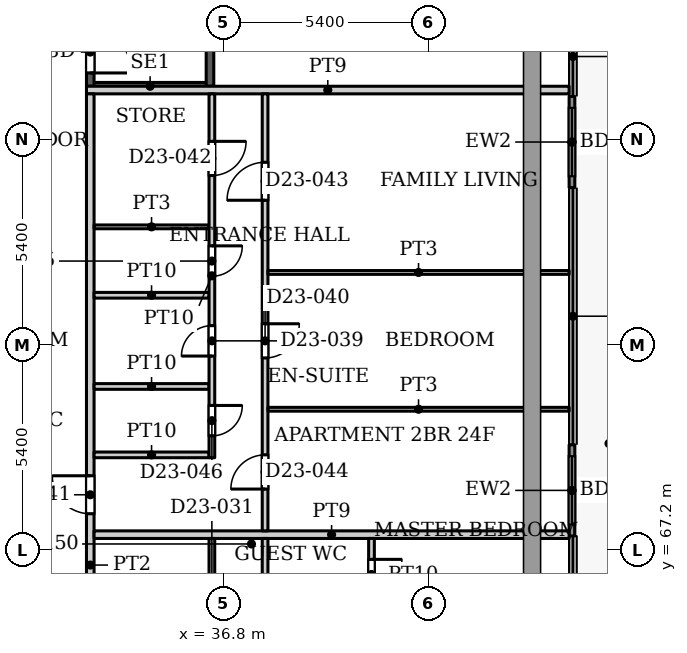
"""IFC4 building model, lengths in metres.
Left out: names, types, materials, properties, quantities, classifications, styles, units other than length and angle.
Written with IfcOpenShell. Run it as: python <this file> out.ifc"""

import sys

from ifc_helpers import new_model, si_unit, direction, frame, frame_2d, origin, place, context, subcontext, project, spatial, rectangle, extrude, source, transform, mapped, element, fill, save


model = new_model("IFC4")
c1 = context("Model", 3, precision=1e-05, world=origin(), true_north=direction((0.0, 1.0)))
c2 = subcontext(c1, "Body", "Model", "MODEL_VIEW")
j1 = project(units=[si_unit("LENGTHUNIT", "METRE"), si_unit("PLANEANGLEUNIT", "RADIAN")], contexts=[c1])
p1 = place(None, origin())
s1 = spatial("IfcSite", under=j1, at=p1, CompositionType="ELEMENT")
p2 = place(p1, origin())
s2 = spatial("IfcBuilding", under=s1, at=p2, CompositionType="ELEMENT")
p3 = place(p2, frame((0.0, 0.0, 105.8)))
s3 = spatial("IfcBuildingStorey", under=s2, at=p3, CompositionType="ELEMENT", Elevation=105.8)
p4 = place(p3, frame((45.975, 79.132, 0.0), z_axis=(0.0, 0.0, 1.0), x_axis=(0.0, -1.0, 0.0)))
e1 = element("IfcWall", 1, at=p4, inside=s3, PredefinedType="SOLIDWALL", context=c2, shape_type="SweptSolid", body=[
    extrude(rectangle(XDim=2.399, YDim=0.15, at=frame_2d((1.2, 0.0))), origin(), (0.0, 0.0, 1.0), 3.75),
])
p5 = place(p4, frame((0.3, 0.0, 0.0)))
e2 = element("IfcOpeningElement", 2, at=p5, cuts=e1, PredefinedType="OPENING", context=c2, shape_type="SweptSolid", body=[
    extrude(rectangle(XDim=1.8, YDim=2.4, at=frame_2d((0.9, 1.2))), frame((0.0, 0.085, 0.0), z_axis=(0.0, -1.0, 0.0), x_axis=(1.0, 0.0, 0.0)), (0.0, 0.0, 1.0), 0.17),
])
p6 = place(p3, frame((45.975, 69.965, 0.0), z_axis=(0.0, 0.0, 1.0), x_axis=(0.0, -1.0, 0.0)))
e3 = element("IfcWall", 3, at=p6, inside=s3, PredefinedType="SOLIDWALL", context=c2, shape_type="SweptSolid", body=[
    extrude(rectangle(XDim=2.4, YDim=0.15, at=frame_2d((1.2, 0.0))), origin(), (0.0, 0.0, 1.0), 3.75),
])
p7 = place(p6, frame((0.3, 0.0, 0.0)))
e4 = element("IfcOpeningElement", 4, at=p7, cuts=e3, PredefinedType="OPENING", context=c2, shape_type="SweptSolid", body=[
    extrude(rectangle(XDim=1.8, YDim=2.4, at=frame_2d((0.9, 1.2))), frame((0.0, 0.085, 0.0), z_axis=(0.0, -1.0, 0.0), x_axis=(1.0, 0.0, 0.0)), (0.0, 0.0, 1.0), 0.17),
])
p8 = place(p3, frame((33.3, 79.4, 0.0), z_axis=(0.0, 0.0, 1.0), x_axis=(1.0, 0.0, 0.0)))
e5 = element("IfcWall", 5, at=p8, inside=s3, PredefinedType="SHEAR", context=c2, shape_type="SweptSolid", body=[
    extrude(rectangle(XDim=3.15, YDim=0.2, at=frame_2d((1.575, 0.0))), origin(), (0.0, 0.0, 1.0), 3.9),
])
p9 = place(p3, frame((33.3, 79.4, 0.0), z_axis=(0.0, 0.0, 1.0), x_axis=(0.0, 1.0, 0.0)))
e6 = element("IfcWall", 6, at=p9, inside=s3, PredefinedType="SHEAR", context=c2, shape_type="SweptSolid", body=[
    extrude(rectangle(XDim=9.16, YDim=0.2, at=frame_2d((4.58, 0.0))), origin(), (0.0, 0.0, 1.0), 3.9),
])
p10 = place(p9, frame((0.35, 0.0, 0.0)))
e7 = element("IfcOpeningElement", 7, at=p10, cuts=e6, PredefinedType="OPENING", context=c2, shape_type="SweptSolid", body=[
    extrude(rectangle(XDim=1.1, YDim=2.2, at=frame_2d((0.55, 1.1))), frame((0.0, 0.11, 0.0), z_axis=(0.0, -1.0, 0.0), x_axis=(1.0, 0.0, 0.0)), (0.0, 0.0, 1.0), 0.22),
])
p11 = place(p3, frame((36.45, 79.4, 0.0), z_axis=(0.0, 0.0, 1.0), x_axis=(0.0, 1.0, 0.0)))
e8 = element("IfcWall", 8, at=p11, inside=s3, PredefinedType="SHEAR", context=c2, shape_type="SweptSolid", body=[
    extrude(rectangle(XDim=9.16, YDim=0.2, at=frame_2d((4.58, 0.0))), origin(), (0.0, 0.0, 1.0), 3.9),
])
p12 = place(p3, frame((33.2, 79.3, 0.0), z_axis=(0.0, 0.0, 1.0), x_axis=(1.0, 0.0, 0.0)))
e9 = element("IfcWall", 9, at=p12, inside=s3, PredefinedType="PARTITIONING", context=c2, shape_type="SweptSolid", body=[
    extrude(rectangle(XDim=12.7, YDim=0.2, at=frame_2d((6.35, 0.0))), origin(), (0.0, 0.0, 1.0), 3.6),
])
p13 = place(p3, frame((33.3, 54.4, 0.0), z_axis=(0.0, 0.0, 1.0), x_axis=(0.0, 1.0, 0.0)))
e10 = element("IfcWall", 10, at=p13, inside=s3, PredefinedType="PARTITIONING", context=c2, shape_type="SweptSolid", body=[
    extrude(rectangle(XDim=24.8, YDim=0.2, at=frame_2d((12.4, 0.0))), origin(), (0.0, 0.0, 1.0), 3.6),
])
p14 = place(p13, frame((0.4, 0.0, 0.0)))
e11 = element("IfcOpeningElement", 11, at=p14, cuts=e10, PredefinedType="OPENING", context=c2, shape_type="SweptSolid", body=[
    extrude(rectangle(XDim=1.0, YDim=2.1, at=frame_2d((0.5, 1.05))), frame((0.0, 0.11, 0.0), z_axis=(0.0, -1.0, 0.0), x_axis=(1.0, 0.0, 0.0)), (0.0, 0.0, 1.0), 0.22),
])
p15 = place(p13, frame((13.75, 0.0, 0.0)))
e12 = element("IfcOpeningElement", 12, at=p15, cuts=e10, PredefinedType="OPENING", context=c2, shape_type="SweptSolid", body=[
    extrude(rectangle(XDim=1.0, YDim=2.1, at=frame_2d((0.5, 1.05))), frame((0.0, 0.11, 0.0), z_axis=(0.0, -1.0, 0.0), x_axis=(1.0, 0.0, 0.0)), (0.0, 0.0, 1.0), 0.22),
])
p16 = place(p3, frame((33.4, 67.6, 0.0), z_axis=(0.0, 0.0, 1.0), x_axis=(1.0, 0.0, 0.0)))
e13 = element("IfcWall", 13, at=p16, inside=s3, PredefinedType="PARTITIONING", context=c2, shape_type="SweptSolid", body=[
    extrude(rectangle(XDim=12.5, YDim=0.2, at=frame_2d((6.25, 0.0))), origin(), (0.0, 0.0, 1.0), 3.6),
])
for number, where, z_axis, x_axis in (
    (14, (33.4, 69.7, 0.0), (0.0, 0.0, 1.0), (1.0, 0.0, 0.0)),
    (15, (33.4, 71.5, 0.0), (0.0, 0.0, 1.0), (1.0, 0.0, 0.0)),
    (16, (33.4, 73.9, 0.0), (0.0, 0.0, 1.0), (1.0, 0.0, 0.0)),
):
    element("IfcWall", number, at=place(p3, frame(where, z_axis=z_axis, x_axis=x_axis)), inside=s3, PredefinedType="PARTITIONING", context=c2, shape_type="SweptSolid", body=[
        extrude(rectangle(XDim=3.025, YDim=0.15, at=frame_2d((1.513, 0.0))), origin(), (0.0, 0.0, 1.0), 3.6),
    ])
p17 = place(p3, frame((33.4, 75.7, 0.0), z_axis=(0.0, 0.0, 1.0), x_axis=(1.0, 0.0, 0.0)))
e17 = element("IfcWall", 17, at=p17, inside=s3, PredefinedType="PARTITIONING", context=c2, shape_type="SweptSolid", body=[
    extrude(rectangle(XDim=3.025, YDim=0.1, at=frame_2d((1.513, 0.0))), origin(), (0.0, 0.0, 1.0), 3.6),
])
p18 = place(p3, frame((36.5, 57.35, 0.0), z_axis=(0.0, 0.0, 1.0), x_axis=(0.0, 1.0, 0.0)))
e18 = element("IfcWall", 18, at=p18, inside=s3, PredefinedType="PARTITIONING", context=c2, shape_type="SweptSolid", body=[
    extrude(rectangle(XDim=10.15, YDim=0.15, at=frame_2d((5.075, 0.0))), origin(), (0.0, 0.0, 1.0), 3.6),
])
p19 = place(p18, frame((8.35, 0.0, 0.0)))
e19 = element("IfcOpeningElement", 19, at=p19, cuts=e18, PredefinedType="OPENING", context=c2, shape_type="SweptSolid", body=[
    extrude(rectangle(XDim=0.8, YDim=2.1, at=frame_2d((0.4, 1.05))), frame((0.0, 0.085, 0.0), z_axis=(0.0, -1.0, 0.0), x_axis=(1.0, 0.0, 0.0)), (0.0, 0.0, 1.0), 0.17),
])
p20 = place(p18, frame((1.6, 0.0, 0.0)))
e20 = element("IfcOpeningElement", 20, at=p20, cuts=e18, PredefinedType="OPENING", context=c2, shape_type="SweptSolid", body=[
    extrude(rectangle(XDim=0.9, YDim=2.1, at=frame_2d((0.45, 1.05))), frame((0.0, 0.085, 0.0), z_axis=(0.0, -1.0, 0.0), x_axis=(1.0, 0.0, 0.0)), (0.0, 0.0, 1.0), 0.17),
])
p21 = place(p18, frame((5.65, 0.0, 0.0)))
e21 = element("IfcOpeningElement", 21, at=p21, cuts=e18, PredefinedType="OPENING", context=c2, shape_type="SweptSolid", body=[
    extrude(rectangle(XDim=0.8, YDim=2.1, at=frame_2d((0.4, 1.05))), frame((0.0, 0.085, 0.0), z_axis=(0.0, -1.0, 0.0), x_axis=(1.0, 0.0, 0.0)), (0.0, 0.0, 1.0), 0.17),
])
p22 = place(p3, frame((36.5, 69.625, 0.0), z_axis=(0.0, 0.0, 1.0), x_axis=(0.0, 1.0, 0.0)))
e22 = element("IfcWall", 22, at=p22, inside=s3, PredefinedType="PARTITIONING", context=c2, shape_type="SweptSolid", body=[
    extrude(rectangle(XDim=9.575, YDim=0.15, at=frame_2d((4.788, 0.0))), origin(), (0.0, 0.0, 1.0), 3.6),
])
p23 = place(p22, frame((2.675, 0.0, 0.0)))
e23 = element("IfcOpeningElement", 23, at=p23, cuts=e22, PredefinedType="OPENING", context=c2, shape_type="SweptSolid", body=[
    extrude(rectangle(XDim=0.8, YDim=2.1, at=frame_2d((0.4, 1.05))), frame((0.0, 0.085, 0.0), z_axis=(0.0, -1.0, 0.0), x_axis=(1.0, 0.0, 0.0)), (0.0, 0.0, 1.0), 0.17),
])
p24 = place(p22, frame((7.425, 0.0, 0.0)))
e24 = element("IfcOpeningElement", 24, at=p24, cuts=e22, PredefinedType="OPENING", context=c2, shape_type="SweptSolid", body=[
    extrude(rectangle(XDim=0.9, YDim=2.1, at=frame_2d((0.45, 1.05))), frame((0.0, 0.085, 0.0), z_axis=(0.0, -1.0, 0.0), x_axis=(1.0, 0.0, 0.0)), (0.0, 0.0, 1.0), 0.17),
])
p25 = place(p22, frame((4.775, 0.0, 0.0)))
e25 = element("IfcOpeningElement", 25, at=p25, cuts=e22, PredefinedType="OPENING", context=c2, shape_type="SweptSolid", body=[
    extrude(rectangle(XDim=0.8, YDim=2.1, at=frame_2d((0.4, 1.05))), frame((0.0, 0.085, 0.0), z_axis=(0.0, -1.0, 0.0), x_axis=(1.0, 0.0, 0.0)), (0.0, 0.0, 1.0), 0.17),
])
p26 = place(p22, frame((0.575, 0.0, 0.0)))
e26 = element("IfcOpeningElement", 26, at=p26, cuts=e22, PredefinedType="OPENING", context=c2, shape_type="SweptSolid", body=[
    extrude(rectangle(XDim=0.8, YDim=2.1, at=frame_2d((0.4, 1.05))), frame((0.0, 0.085, 0.0), z_axis=(0.0, -1.0, 0.0), x_axis=(1.0, 0.0, 0.0)), (0.0, 0.0, 1.0), 0.17),
])
p27 = place(p3, frame((37.9, 54.2, 0.0), z_axis=(0.0, 0.0, 1.0), x_axis=(0.0, 1.0, 0.0)))
e27 = element("IfcWall", 27, at=p27, inside=s3, PredefinedType="PARTITIONING", context=c2, shape_type="SweptSolid", body=[
    extrude(rectangle(XDim=13.3, YDim=0.15, at=frame_2d((6.65, 0.0))), origin(), (0.0, 0.0, 1.0), 3.6),
])
p28 = place(p27, frame((6.2, 0.0, 0.0)))
e28 = element("IfcOpeningElement", 28, at=p28, cuts=e27, PredefinedType="OPENING", context=c2, shape_type="SweptSolid", body=[
    extrude(rectangle(XDim=0.9, YDim=2.1, at=frame_2d((0.45, 1.05))), frame((0.0, 0.085, 0.0), z_axis=(0.0, -1.0, 0.0), x_axis=(1.0, 0.0, 0.0)), (0.0, 0.0, 1.0), 0.17),
])
p29 = place(p27, frame((1.95, 0.0, 0.0)))
e29 = element("IfcOpeningElement", 29, at=p29, cuts=e27, PredefinedType="OPENING", context=c2, shape_type="SweptSolid", body=[
    extrude(rectangle(XDim=1.0, YDim=2.1, at=frame_2d((0.5, 1.05))), frame((0.0, 0.085, 0.0), z_axis=(0.0, -1.0, 0.0), x_axis=(1.0, 0.0, 0.0)), (0.0, 0.0, 1.0), 0.17),
])
p30 = place(p27, frame((9.35, 0.0, 0.0)))
e30 = element("IfcOpeningElement", 30, at=p30, cuts=e27, PredefinedType="OPENING", context=c2, shape_type="SweptSolid", body=[
    extrude(rectangle(XDim=0.9, YDim=2.1, at=frame_2d((0.45, 1.05))), frame((0.0, 0.085, 0.0), z_axis=(0.0, -1.0, 0.0), x_axis=(1.0, 0.0, 0.0)), (0.0, 0.0, 1.0), 0.17),
])
p31 = place(p3, frame((37.9, 67.7, 0.0), z_axis=(0.0, 0.0, 1.0), x_axis=(0.0, 1.0, 0.0)))
e31 = element("IfcWall", 31, at=p31, inside=s3, PredefinedType="PARTITIONING", context=c2, shape_type="SweptSolid", body=[
    extrude(rectangle(XDim=11.5, YDim=0.15, at=frame_2d((5.75, 0.0))), origin(), (0.0, 0.0, 1.0), 3.6),
])
p32 = place(p31, frame((4.55, 0.0, 0.0)))
e32 = element("IfcOpeningElement", 32, at=p32, cuts=e31, PredefinedType="OPENING", context=c2, shape_type="SweptSolid", body=[
    extrude(rectangle(XDim=0.9, YDim=2.1, at=frame_2d((0.45, 1.05))), frame((0.0, 0.085, 0.0), z_axis=(0.0, -1.0, 0.0), x_axis=(1.0, 0.0, 0.0)), (0.0, 0.0, 1.0), 0.17),
])
p33 = place(p31, frame((8.7, 0.0, 0.0)))
e33 = element("IfcOpeningElement", 33, at=p33, cuts=e31, PredefinedType="OPENING", context=c2, shape_type="SweptSolid", body=[
    extrude(rectangle(XDim=1.0, YDim=2.1, at=frame_2d((0.5, 1.05))), frame((0.0, 0.085, 0.0), z_axis=(0.0, -1.0, 0.0), x_axis=(1.0, 0.0, 0.0)), (0.0, 0.0, 1.0), 0.17),
])
p34 = place(p31, frame((1.1, 0.0, 0.0)))
e34 = element("IfcOpeningElement", 34, at=p34, cuts=e31, PredefinedType="OPENING", context=c2, shape_type="SweptSolid", body=[
    extrude(rectangle(XDim=0.9, YDim=2.1, at=frame_2d((0.45, 1.05))), frame((0.0, 0.085, 0.0), z_axis=(0.0, -1.0, 0.0), x_axis=(1.0, 0.0, 0.0)), (0.0, 0.0, 1.0), 0.17),
])
for number, where, z_axis, x_axis in (
    (35, (37.975, 70.9, 0.0), (0.0, 0.0, 1.0), (1.0, 0.0, 0.0)),
    (36, (37.975, 74.5, 0.0), (0.0, 0.0, 1.0), (1.0, 0.0, 0.0)),
):
    element("IfcWall", number, at=place(p3, frame(where, z_axis=z_axis, x_axis=x_axis)), inside=s3, PredefinedType="PARTITIONING", context=c2, shape_type="SweptSolid", body=[
        extrude(rectangle(XDim=7.925, YDim=0.1, at=frame_2d((3.962, 0.0))), origin(), (0.0, 0.0, 1.0), 3.6),
    ])
p35 = place(p3, frame((40.7, 65.575, 0.0), z_axis=(0.0, 0.0, 1.0), x_axis=(0.0, 1.0, 0.0)))
e37 = element("IfcWall", 37, at=p35, inside=s3, PredefinedType="PARTITIONING", context=c2, shape_type="SweptSolid", body=[
    extrude(rectangle(XDim=1.925, YDim=0.15, at=frame_2d((0.962, 0.0))), origin(), (0.0, 0.0, 1.0), 3.6),
])
p36 = place(p35, frame((0.575, 0.0, 0.0)))
e38 = element("IfcOpeningElement", 38, at=p36, cuts=e37, PredefinedType="OPENING", context=c2, shape_type="SweptSolid", body=[
    extrude(rectangle(XDim=0.8, YDim=2.1, at=frame_2d((0.4, 1.05))), frame((0.0, 0.085, 0.0), z_axis=(0.0, -1.0, 0.0), x_axis=(1.0, 0.0, 0.0)), (0.0, 0.0, 1.0), 0.17),
])
m1 = source(origin(), c2, "Body", "SweptSolid", [
    extrude(rectangle(XDim=1.8, YDim=2.4, at=frame_2d((0.9, 1.2))), frame((0.0, 0.025, 0.0), z_axis=(0.0, -1.0, 0.0), x_axis=(1.0, 0.0, 0.0)), (0.0, 0.0, 1.0), 0.05),
])
p37 = place(p5, origin())
e39 = element("IfcDoor", 39, at=p37, inside=s3, OperationType="SLIDING_TO_LEFT", PredefinedType="DOOR", context=c2, shape_type="MappedRepresentation", body=[
    mapped(m1, transform((0.0, 0.0, 0.0), x_axis=(1.0, 0.0, 0.0), y_axis=(0.0, 1.0, 0.0), z_axis=(0.0, 0.0, 1.0), scale=1.0)),
])
fill(e2, e39)
p38 = place(p7, origin())
e40 = element("IfcDoor", 40, at=p38, inside=s3, OperationType="SLIDING_TO_LEFT", PredefinedType="DOOR", context=c2, shape_type="MappedRepresentation", body=[
    mapped(m1, transform((0.0, 0.0, 0.0), x_axis=(1.0, 0.0, 0.0), y_axis=(0.0, 1.0, 0.0), z_axis=(0.0, 0.0, 1.0), scale=1.0)),
])
fill(e4, e40)
m2 = source(origin(), c2, "Body", "SweptSolid", [
    extrude(rectangle(XDim=1.1, YDim=2.2, at=frame_2d((0.55, 1.1))), frame((0.0, 0.025, 0.0), z_axis=(0.0, -1.0, 0.0), x_axis=(1.0, 0.0, 0.0)), (0.0, 0.0, 1.0), 0.05),
])
p39 = place(p10, origin())
e41 = element("IfcDoor", 41, at=p39, inside=s3, OperationType="SINGLE_SWING_RIGHT", PredefinedType="DOOR", context=c2, shape_type="MappedRepresentation", body=[
    mapped(m2, transform((0.0, 0.0, 0.0), x_axis=(1.0, 0.0, 0.0), y_axis=(0.0, 1.0, 0.0), z_axis=(0.0, 0.0, 1.0), scale=1.0)),
])
fill(e7, e41)
m3 = source(origin(), c2, "Body", "SweptSolid", [
    extrude(rectangle(XDim=0.8, YDim=2.1, at=frame_2d((0.4, 1.05))), frame((0.0, 0.025, 0.0), z_axis=(0.0, -1.0, 0.0), x_axis=(1.0, 0.0, 0.0)), (0.0, 0.0, 1.0), 0.05),
])
p40 = place(p36, origin())
e42 = element("IfcDoor", 42, at=p40, inside=s3, OperationType="SINGLE_SWING_RIGHT", PredefinedType="DOOR", context=c2, shape_type="MappedRepresentation", body=[
    mapped(m3, transform((0.0, 0.0, 0.0), x_axis=(1.0, 0.0, 0.0), y_axis=(0.0, 1.0, 0.0), z_axis=(0.0, 0.0, 1.0), scale=1.0)),
])
fill(e38, e42)
p41 = place(p23, origin())
e43 = element("IfcDoor", 43, at=p41, inside=s3, OperationType="SINGLE_SWING_LEFT", PredefinedType="DOOR", context=c2, shape_type="MappedRepresentation", body=[
    mapped(m3, transform((0.0, 0.0, 0.0), x_axis=(1.0, 0.0, 0.0), y_axis=(0.0, 1.0, 0.0), z_axis=(0.0, 0.0, 1.0), scale=1.0)),
])
fill(e23, e43)
m4 = source(origin(), c2, "Body", "SweptSolid", [
    extrude(rectangle(XDim=0.9, YDim=2.1, at=frame_2d((0.45, 1.05))), frame((0.0, 0.025, 0.0), z_axis=(0.0, -1.0, 0.0), x_axis=(1.0, 0.0, 0.0)), (0.0, 0.0, 1.0), 0.05),
])
p42 = place(p32, origin())
e44 = element("IfcDoor", 44, at=p42, inside=s3, OperationType="SINGLE_SWING_RIGHT", PredefinedType="DOOR", context=c2, shape_type="MappedRepresentation", body=[
    mapped(m4, transform((0.0, 0.0, 0.0), x_axis=(1.0, 0.0, 0.0), y_axis=(0.0, 1.0, 0.0), z_axis=(0.0, 0.0, 1.0), scale=1.0)),
])
fill(e32, e44)
m5 = source(origin(), c2, "Body", "SweptSolid", [
    extrude(rectangle(XDim=1.0, YDim=2.1, at=frame_2d((0.5, 1.05))), frame((0.0, 0.025, 0.0), z_axis=(0.0, -1.0, 0.0), x_axis=(1.0, 0.0, 0.0)), (0.0, 0.0, 1.0), 0.05),
])
p43 = place(p15, origin())
e45 = element("IfcDoor", 45, at=p43, inside=s3, OperationType="SINGLE_SWING_LEFT", PredefinedType="DOOR", context=c2, shape_type="MappedRepresentation", body=[
    mapped(m5, transform((0.0, 0.0, 0.0), x_axis=(1.0, 0.0, 0.0), y_axis=(0.0, 1.0, 0.0), z_axis=(0.0, 0.0, 1.0), scale=1.0)),
])
fill(e12, e45)
p44 = place(p24, origin())
e46 = element("IfcDoor", 46, at=p44, inside=s3, OperationType="SINGLE_SWING_RIGHT", PredefinedType="DOOR", context=c2, shape_type="MappedRepresentation", body=[
    mapped(m4, transform((0.0, 0.0, 0.0), x_axis=(1.0, 0.0, 0.0), y_axis=(0.0, 1.0, 0.0), z_axis=(0.0, 0.0, 1.0), scale=1.0)),
])
fill(e24, e46)
m6 = source(origin(), c2, "Body", "SweptSolid", [
    extrude(rectangle(XDim=1.0, YDim=2.1, at=frame_2d((0.5, 1.05))), frame((0.0, 0.025, 0.0), z_axis=(0.0, -1.0, 0.0), x_axis=(1.0, 0.0, 0.0)), (0.0, 0.0, 1.0), 0.05),
])
p45 = place(p33, origin())
e47 = element("IfcDoor", 47, at=p45, inside=s3, OperationType="SINGLE_SWING_LEFT", PredefinedType="DOOR", context=c2, shape_type="MappedRepresentation", body=[
    mapped(m6, transform((0.0, 0.0, 0.0), x_axis=(1.0, 0.0, 0.0), y_axis=(0.0, 1.0, 0.0), z_axis=(0.0, 0.0, 1.0), scale=1.0)),
])
fill(e33, e47)
p46 = place(p34, origin())
e48 = element("IfcDoor", 48, at=p46, inside=s3, OperationType="SINGLE_SWING_LEFT", PredefinedType="DOOR", context=c2, shape_type="MappedRepresentation", body=[
    mapped(m4, transform((0.0, 0.0, 0.0), x_axis=(1.0, 0.0, 0.0), y_axis=(0.0, 1.0, 0.0), z_axis=(0.0, 0.0, 1.0), scale=1.0)),
])
fill(e34, e48)
p47 = place(p25, origin())
e49 = element("IfcDoor", 49, at=p47, inside=s3, OperationType="SINGLE_SWING_RIGHT", PredefinedType="DOOR", context=c2, shape_type="MappedRepresentation", body=[
    mapped(m3, transform((0.0, 0.0, 0.0), x_axis=(1.0, 0.0, 0.0), y_axis=(0.0, 1.0, 0.0), z_axis=(0.0, 0.0, 1.0), scale=1.0)),
])
fill(e25, e49)
p48 = place(p26, origin())
e50 = element("IfcDoor", 50, at=p48, inside=s3, OperationType="SINGLE_SWING_RIGHT", PredefinedType="DOOR", context=c2, shape_type="MappedRepresentation", body=[
    mapped(m3, transform((0.0, 0.0, 0.0), x_axis=(1.0, 0.0, 0.0), y_axis=(0.0, 1.0, 0.0), z_axis=(0.0, 0.0, 1.0), scale=1.0)),
])
fill(e26, e50)
save(model, sys.argv[1])
